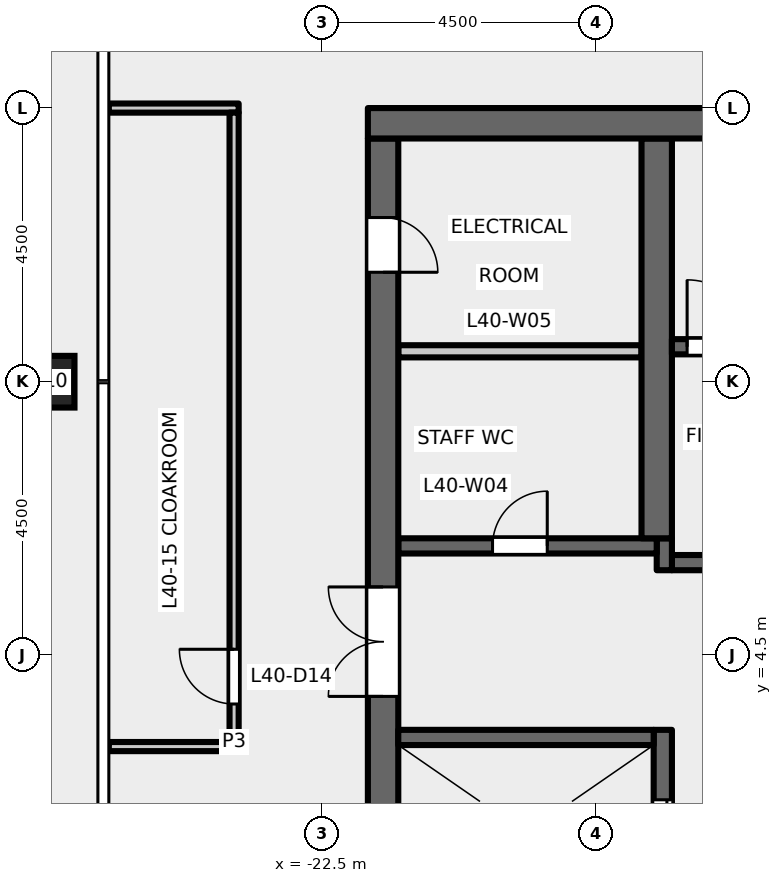
"""IFC4 building model, lengths in metres.
Left out: names, types, materials, properties, quantities, classifications, styles, units other than length and angle.
Written with IfcOpenShell. Run it as: python <this file> out.ifc"""

import sys

from ifc_helpers import new_model, si_unit, direction, frame, frame_2d, origin, origin_2d, place, context, subcontext, project, spatial, rectangle, hollow_rectangle, extrude, element, fill, save


model = new_model("IFC4")
c1 = context("Model", 3, precision=1e-05, world=origin(), true_north=direction((0.0, 1.0)))
c2 = subcontext(c1, "Body", "Model", "MODEL_VIEW")
j1 = project(units=[si_unit("LENGTHUNIT", "METRE"), si_unit("PLANEANGLEUNIT", "RADIAN")], contexts=[c1])
p1 = place(None, origin())
s1 = spatial("IfcSite", under=j1, at=p1, CompositionType="ELEMENT")
p2 = place(p1, origin())
s2 = spatial("IfcBuilding", under=s1, at=p2, CompositionType="ELEMENT")
p3 = place(p2, frame((0.0, 0.0, 187.2)))
s3 = spatial("IfcBuildingStorey", under=s2, at=p3, CompositionType="ELEMENT", Elevation=187.2)
p4 = place(p3, frame((-27.0, 9.0, -0.2), z_axis=(0.0, 0.0, 1.0), x_axis=(1.0, 0.0, 0.0)))
e1 = element("IfcColumn", 1, at=p4, inside=s3, PredefinedType="COLUMN", context=c2, shape_type="SweptSolid", body=[
    extrude(hollow_rectangle(XDim=0.85, YDim=0.85, WallThickness=0.05, at=origin_2d()), origin(), (0.0, 0.0, 1.0), 5.7),
])
p5 = place(p3, frame((-12.15, 6.025, 0.0), z_axis=(0.0, 0.0, 1.0), x_axis=(-1.0, 0.0, 0.0)))
e2 = element("IfcWall", 2, at=p5, inside=s3, PredefinedType="SHEAR", context=c2, shape_type="SweptSolid", body=[
    extrude(rectangle(XDim=4.6, YDim=0.25, at=frame_2d((2.3, 0.0))), origin(), (0.0, 0.0, 1.0), 5.35),
])
p6 = place(p5, frame((1.8, 0.0, 0.0)))
e3 = element("IfcOpeningElement", 3, at=p6, cuts=e2, PredefinedType="OPENING", context=c2, shape_type="SweptSolid", body=[
    extrude(rectangle(XDim=1.0, YDim=2.1, at=frame_2d((0.5, 1.05))), frame((0.0, 0.135, 0.0), z_axis=(0.0, -1.0, 0.0), x_axis=(1.0, 0.0, 0.0)), (0.0, 0.0, 1.0), 0.27),
])
p7 = place(p3, frame((-16.875, 5.9, 0.0), z_axis=(0.0, 0.0, 1.0), x_axis=(0.0, 1.0, 0.0)))
e4 = element("IfcWall", 4, at=p7, inside=s3, PredefinedType="SHEAR", context=c2, shape_type="SweptSolid", body=[
    extrude(rectangle(XDim=0.525, YDim=0.25, at=frame_2d((0.263, 0.0))), origin(), (0.0, 0.0, 1.0), 5.35),
])
p8 = place(p3, frame((-17.0, 6.3, 0.0), z_axis=(0.0, 0.0, 1.0), x_axis=(-1.0, 0.0, 0.0)))
e5 = element("IfcWall", 5, at=p8, inside=s3, PredefinedType="SHEAR", context=c2, shape_type="SweptSolid", body=[
    extrude(rectangle(XDim=4.25, YDim=0.25, at=frame_2d((2.125, 0.0))), origin(), (0.0, 0.0, 1.0), 5.35),
])
p9 = place(p8, frame((1.8, 0.0, 0.0)))
e6 = element("IfcOpeningElement", 6, at=p9, cuts=e5, PredefinedType="OPENING", context=c2, shape_type="SweptSolid", body=[
    extrude(rectangle(XDim=0.9, YDim=2.1, at=frame_2d((0.45, 1.05))), frame((0.0, 0.135, 0.0), z_axis=(0.0, -1.0, 0.0), x_axis=(1.0, 0.0, 0.0)), (0.0, 0.0, 1.0), 0.27),
])
p10 = place(p3, frame((-21.5, -13.0, 0.0), z_axis=(0.0, 0.0, 1.0), x_axis=(0.0, 1.0, 0.0)))
e7 = element("IfcWall", 7, at=p10, inside=s3, PredefinedType="SHEAR", context=c2, shape_type="SweptSolid", body=[
    extrude(rectangle(XDim=26.0, YDim=0.5, at=frame_2d((13.0, 0.0))), origin(), (0.0, 0.0, 1.0), 5.35),
])
p11 = place(p10, frame((16.825, 0.0, 0.0)))
e8 = element("IfcOpeningElement", 8, at=p11, cuts=e7, PredefinedType="OPENING", context=c2, shape_type="SweptSolid", body=[
    extrude(rectangle(XDim=1.8, YDim=2.1, at=frame_2d((0.9, 1.05))), frame((0.0, 0.26, 0.0), z_axis=(0.0, -1.0, 0.0), x_axis=(1.0, 0.0, 0.0)), (0.0, 0.0, 1.0), 0.52),
])
p12 = place(p10, frame((7.375, 0.0, 0.0)))
e9 = element("IfcOpeningElement", 9, at=p12, cuts=e7, PredefinedType="OPENING", context=c2, shape_type="SweptSolid", body=[
    extrude(rectangle(XDim=1.8, YDim=2.1, at=frame_2d((0.9, 1.05))), frame((0.0, 0.26, 0.0), z_axis=(0.0, -1.0, 0.0), x_axis=(1.0, 0.0, 0.0)), (0.0, 0.0, 1.0), 0.52),
])
p13 = place(p10, frame((23.8, 0.0, 0.0)))
e10 = element("IfcOpeningElement", 10, at=p13, cuts=e7, PredefinedType="OPENING", context=c2, shape_type="SweptSolid", body=[
    extrude(rectangle(XDim=0.9, YDim=2.1, at=frame_2d((0.45, 1.05))), frame((0.0, 0.26, 0.0), z_axis=(0.0, -1.0, 0.0), x_axis=(1.0, 0.0, 0.0)), (0.0, 0.0, 1.0), 0.52),
])
p14 = place(p3, frame((-17.25, 9.5, 0.0), z_axis=(0.0, 0.0, 1.0), x_axis=(-1.0, 0.0, 0.0)))
e11 = element("IfcWall", 11, at=p14, inside=s3, PredefinedType="PARTITIONING", context=c2, shape_type="SweptSolid", body=[
    extrude(rectangle(XDim=4.0, YDim=0.2, at=frame_2d((2.0, 0.0))), origin(), (0.0, 0.0, 1.0), 5.35),
])
p15 = place(p3, frame((-16.9, -3.275, 0.0), z_axis=(0.0, 0.0, 1.0), x_axis=(0.0, 1.0, 0.0)))
e12 = element("IfcWall", 12, at=p15, inside=s3, PredefinedType="SHEAR", context=c2, shape_type="SweptSolid", body=[
    extrude(rectangle(XDim=6.55, YDim=0.3, at=frame_2d((3.275, 0.0))), origin(), (0.0, 0.0, 1.0), 5.35),
])
p16 = place(p15, frame((1.15, 0.0, 0.0)))
e13 = element("IfcOpeningElement", 13, at=p16, cuts=e12, PredefinedType="OPENING", context=c2, shape_type="SweptSolid", body=[
    extrude(rectangle(XDim=1.1, YDim=2.1, at=frame_2d((0.55, 1.05))), frame((0.0, 0.16, 0.0), z_axis=(0.0, -1.0, 0.0), x_axis=(1.0, 0.0, 0.0)), (0.0, 0.0, 1.0), 0.32),
])
p17 = place(p15, frame((4.3, 0.0, 0.0)))
e14 = element("IfcOpeningElement", 14, at=p17, cuts=e12, PredefinedType="OPENING", context=c2, shape_type="SweptSolid", body=[
    extrude(rectangle(XDim=1.1, YDim=2.1, at=frame_2d((0.55, 1.05))), frame((0.0, 0.16, 0.0), z_axis=(0.0, -1.0, 0.0), x_axis=(1.0, 0.0, 0.0)), (0.0, 0.0, 1.0), 0.32),
])
p18 = place(p3, frame((-17.05, 3.15, 0.0), z_axis=(0.0, 0.0, 1.0), x_axis=(-1.0, 0.0, 0.0)))
e15 = element("IfcWall", 15, at=p18, inside=s3, PredefinedType="SHEAR", context=c2, shape_type="SweptSolid", body=[
    extrude(rectangle(XDim=4.2, YDim=0.25, at=frame_2d((2.1, 0.0))), origin(), (0.0, 0.0, 1.0), 5.35),
])
p19 = place(p3, frame((-17.0, 6.425, 0.0), z_axis=(0.0, 0.0, 1.0), x_axis=(0.0, 1.0, 0.0)))
e16 = element("IfcWall", 16, at=p19, inside=s3, PredefinedType="SHEAR", context=c2, shape_type="SweptSolid", body=[
    extrude(rectangle(XDim=6.575, YDim=0.5, at=frame_2d((3.288, 0.0))), origin(), (0.0, 0.0, 1.0), 5.35),
])
p20 = place(p3, frame((-8.75, 9.575, 0.0), z_axis=(0.0, 0.0, 1.0), x_axis=(-1.0, 0.0, 0.0)))
e17 = element("IfcWall", 17, at=p20, inside=s3, PredefinedType="SHEAR", context=c2, shape_type="SweptSolid", body=[
    extrude(rectangle(XDim=8.0, YDim=0.25, at=frame_2d((4.0, 0.0))), origin(), (0.0, 0.0, 1.0), 5.35),
])
p21 = place(p20, frame((6.65, 0.0, 0.0)))
e18 = element("IfcOpeningElement", 18, at=p21, cuts=e17, PredefinedType="OPENING", context=c2, shape_type="SweptSolid", body=[
    extrude(rectangle(XDim=1.1, YDim=2.1, at=frame_2d((0.55, 1.05))), frame((0.0, 0.135, 0.0), z_axis=(0.0, -1.0, 0.0), x_axis=(1.0, 0.0, 0.0)), (0.0, 0.0, 1.0), 0.27),
])
p22 = place(p3, frame((-8.25, 13.25, 0.0), z_axis=(0.0, 0.0, 1.0), x_axis=(-1.0, 0.0, 0.0)))
e19 = element("IfcWall", 19, at=p22, inside=s3, PredefinedType="SHEAR", context=c2, shape_type="SweptSolid", body=[
    extrude(rectangle(XDim=13.5, YDim=0.5, at=frame_2d((6.75, 0.0))), origin(), (0.0, 0.0, 1.0), 5.35),
])
for number, where, z_axis, x_axis in (
    (20, (-26.01, 3.0, 0.0), (0.0, 0.0, 1.0), (1.0, 0.0, 0.0)),
    (21, (-26.01, 13.5, 0.0), (0.0, 0.0, 1.0), (1.0, 0.0, 0.0)),
):
    element("IfcWall", number, at=place(p3, frame(where, z_axis=z_axis, x_axis=x_axis)), inside=s3, PredefinedType="PARTITIONING", context=c2, shape_type="SweptSolid", body=[
        extrude(rectangle(XDim=2.135, YDim=0.15, at=frame_2d((1.067, 0.0))), origin(), (0.0, 0.0, 1.0), 5.35),
    ])
p23 = place(p3, frame((-23.95, 3.075, 0.0), z_axis=(0.0, 0.0, 1.0), x_axis=(0.0, 1.0, 0.0)))
e22 = element("IfcWall", 22, at=p23, inside=s3, PredefinedType="PARTITIONING", context=c2, shape_type="SweptSolid", body=[
    extrude(rectangle(XDim=10.35, YDim=0.15, at=frame_2d((5.175, 0.0))), origin(), (0.0, 0.0, 1.0), 5.35),
])
p24 = place(p23, frame((0.625, 0.0, 0.0)))
e23 = element("IfcOpeningElement", 23, at=p24, cuts=e22, PredefinedType="OPENING", context=c2, shape_type="SweptSolid", body=[
    extrude(rectangle(XDim=0.9, YDim=2.1, at=frame_2d((0.45, 1.05))), frame((0.0, 0.085, 0.0), z_axis=(0.0, -1.0, 0.0), x_axis=(1.0, 0.0, 0.0)), (0.0, 0.0, 1.0), 0.17),
])
p25 = place(p21, origin())
e24 = element("IfcDoor", 24, at=p25, inside=s3, OperationType="SINGLE_SWING_RIGHT", PredefinedType="DOOR", context=c2, shape_type="SweptSolid", body=[
    extrude(rectangle(XDim=1.1, YDim=2.1, at=frame_2d((0.55, 1.05))), frame((0.0, 0.025, 0.0), z_axis=(0.0, -1.0, 0.0), x_axis=(1.0, 0.0, 0.0)), (0.0, 0.0, 1.0), 0.05),
])
fill(e18, e24)
p26 = place(p11, origin())
e25 = element("IfcDoor", 25, at=p26, inside=s3, OperationType="DOUBLE_DOOR_DOUBLE_SWING", PredefinedType="DOOR", context=c2, shape_type="SweptSolid", body=[
    extrude(rectangle(XDim=1.8, YDim=2.1, at=frame_2d((0.9, 1.05))), frame((0.0, 0.025, 0.0), z_axis=(0.0, -1.0, 0.0), x_axis=(1.0, 0.0, 0.0)), (0.0, 0.0, 1.0), 0.05),
])
fill(e8, e25)
p27 = place(p17, origin())
e26 = element("IfcDoor", 26, at=p27, inside=s3, OperationType="DOUBLE_DOOR_SLIDING", PredefinedType="DOOR", context=c2, shape_type="SweptSolid", body=[
    extrude(rectangle(XDim=1.1, YDim=2.1, at=frame_2d((0.55, 1.05))), frame((0.0, 0.025, 0.0), z_axis=(0.0, -1.0, 0.0), x_axis=(1.0, 0.0, 0.0)), (0.0, 0.0, 1.0), 0.05),
])
fill(e14, e26)
p28 = place(p9, origin())
e27 = element("IfcDoor", 27, at=p28, inside=s3, OperationType="SINGLE_SWING_LEFT", PredefinedType="DOOR", context=c2, shape_type="SweptSolid", body=[
    extrude(rectangle(XDim=0.9, YDim=2.1, at=frame_2d((0.45, 1.05))), frame((0.0, 0.025, 0.0), z_axis=(0.0, -1.0, 0.0), x_axis=(1.0, 0.0, 0.0)), (0.0, 0.0, 1.0), 0.05),
])
fill(e6, e27)
p29 = place(p13, origin())
e28 = element("IfcDoor", 28, at=p29, inside=s3, OperationType="SINGLE_SWING_LEFT", PredefinedType="DOOR", context=c2, shape_type="SweptSolid", body=[
    extrude(rectangle(XDim=0.9, YDim=2.1, at=frame_2d((0.45, 1.05))), frame((0.0, 0.025, 0.0), z_axis=(0.0, -1.0, 0.0), x_axis=(1.0, 0.0, 0.0)), (0.0, 0.0, 1.0), 0.05),
])
fill(e10, e28)
p30 = place(p24, origin())
e29 = element("IfcDoor", 29, at=p30, inside=s3, OperationType="SINGLE_SWING_RIGHT", PredefinedType="DOOR", context=c2, shape_type="SweptSolid", body=[
    extrude(rectangle(XDim=0.9, YDim=2.1, at=frame_2d((0.45, 1.05))), frame((0.0, 0.025, 0.0), z_axis=(0.0, -1.0, 0.0), x_axis=(1.0, 0.0, 0.0)), (0.0, 0.0, 1.0), 0.05),
])
fill(e23, e29)
save(model, sys.argv[1])
